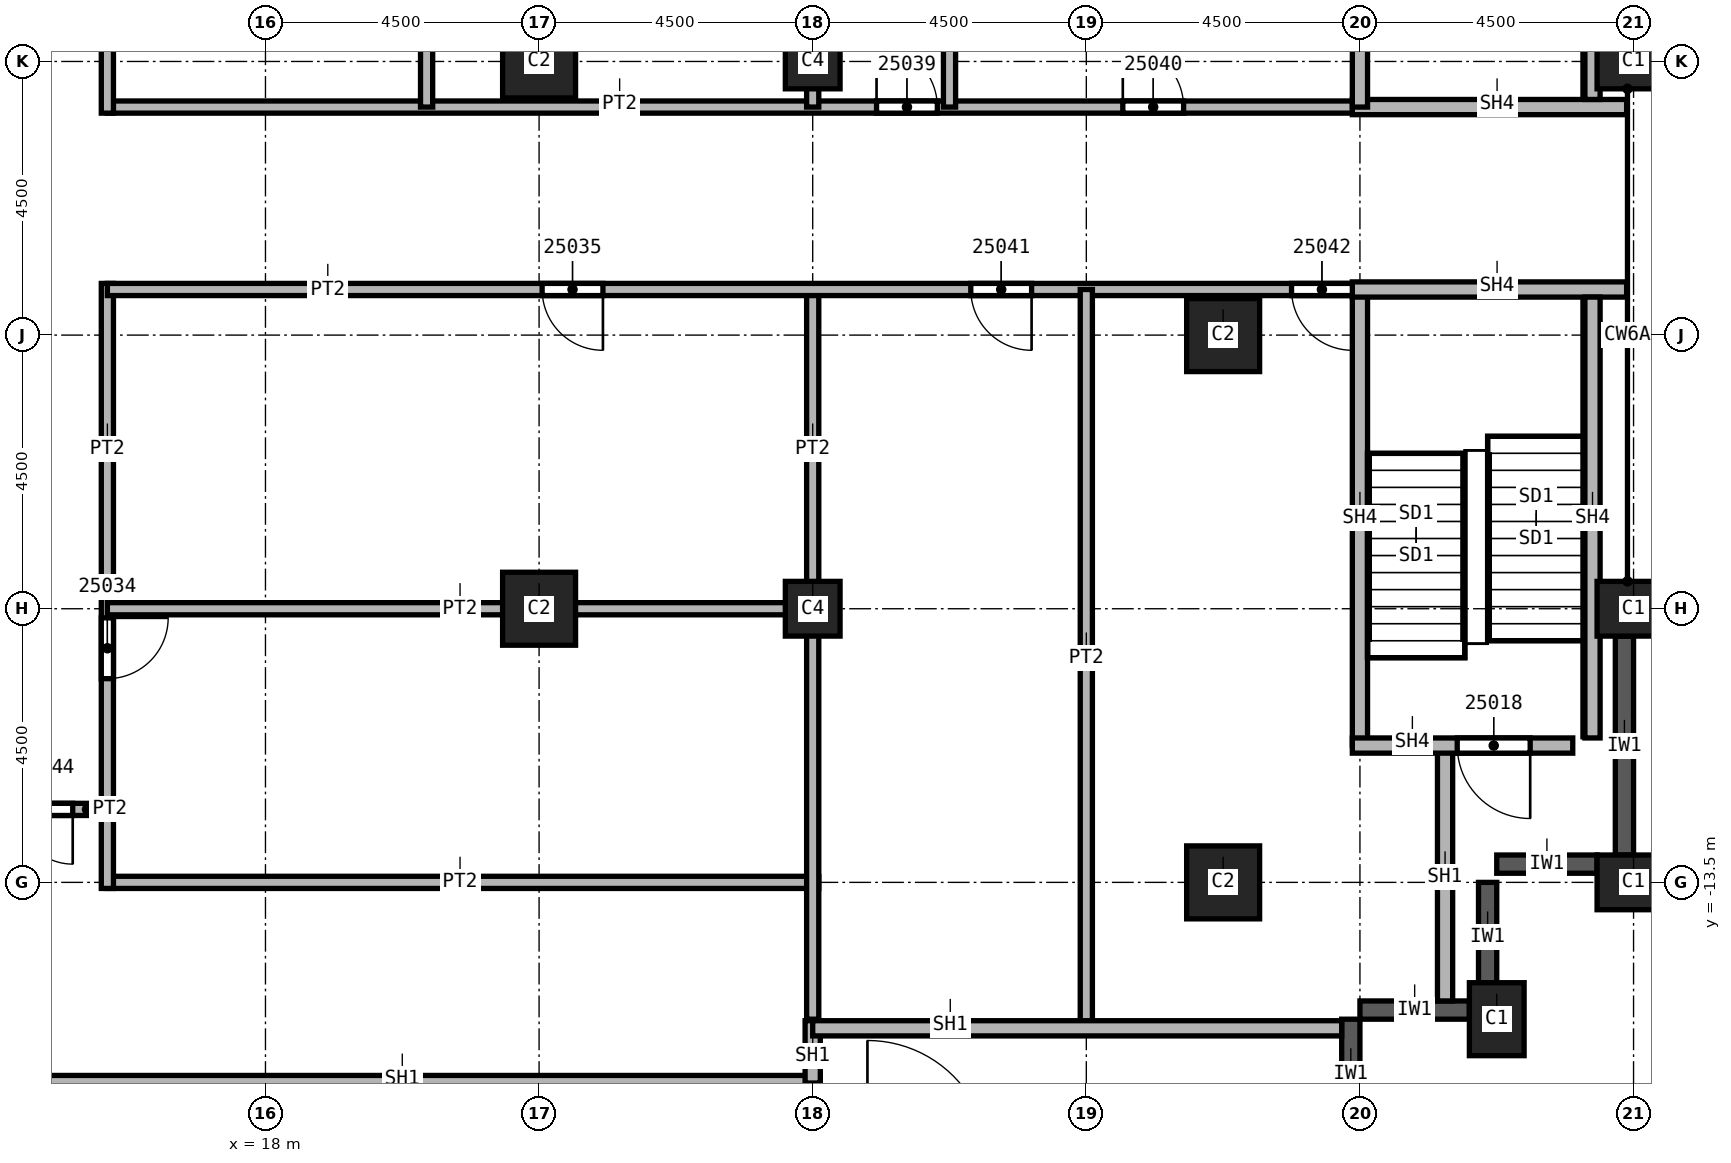
"""IFC4 building model, lengths in metres.
Left out: names, types, materials, properties, quantities, classifications, styles, units other than length and angle.
Written with IfcOpenShell. Run it as: python <this file> out.ifc"""

import sys

from ifc_helpers import new_model, si_unit, direction, frame, frame_2d, origin, origin_2d, place, context, subcontext, project, spatial, rectangle, extrude, element, fill, save


model = new_model("IFC4")
c1 = context("Model", 3, precision=1e-05, world=origin(), true_north=direction((0.0, 1.0)))
c2 = subcontext(c1, "Body", "Model", "MODEL_VIEW")
j1 = project(units=[si_unit("LENGTHUNIT", "METRE"), si_unit("PLANEANGLEUNIT", "RADIAN")], contexts=[c1])
p1 = place(None, origin())
s1 = spatial("IfcSite", under=j1, at=p1, CompositionType="ELEMENT")
p2 = place(p1, origin())
s2 = spatial("IfcBuilding", under=s1, at=p2, CompositionType="ELEMENT")
p3 = place(p2, frame((0.0, 0.0, 60.0)))
s3 = spatial("IfcBuildingStorey", under=s2, at=p3, CompositionType="ELEMENT", Elevation=60.0)
for number, where, z_axis, x_axis in (
    (1, (40.5, 0.0, 0.0), (0.0, 0.0, 1.0), (0.0, 1.0, 0.0)),
    (2, (40.5, -9.0, 0.0), (0.0, 0.0, 1.0), (0.0, 1.0, 0.0)),
    (3, (40.5, -13.5, 0.0), (0.0, 0.0, 1.0), (0.0, 1.0, 0.0)),
    (4, (38.25, -15.75, 0.0), (0.0, 0.0, 1.0), (1.0, 0.0, 0.0)),
):
    element("IfcColumn", number, at=place(p3, frame(where, z_axis=z_axis, x_axis=x_axis)), inside=s3, PredefinedType="COLUMN", context=c2, shape_type="SweptSolid", body=[
        extrude(rectangle(XDim=0.9, YDim=1.2, at=origin_2d()), origin(), (0.0, 0.0, 1.0), 7.7),
    ])
for number, where, z_axis, x_axis in (
    (5, (33.75, -4.5, 0.0), (0.0, 0.0, 1.0), (1.0, 0.0, 0.0)),
    (6, (33.75, -13.5, 0.0), (0.0, 0.0, 1.0), (1.0, 0.0, 0.0)),
    (7, (22.5, 0.0, 0.0), (0.0, 0.0, 1.0), (1.0, 0.0, 0.0)),
    (8, (22.5, -9.0, 0.0), (0.0, 0.0, 1.0), (1.0, 0.0, 0.0)),
):
    element("IfcColumn", number, at=place(p3, frame(where, z_axis=z_axis, x_axis=x_axis)), inside=s3, PredefinedType="COLUMN", context=c2, shape_type="SweptSolid", body=[
        extrude(rectangle(XDim=1.2, YDim=1.2, at=origin_2d()), origin(), (0.0, 0.0, 1.0), 7.7),
    ])
for number, where, z_axis, x_axis in (
    (9, (27.0, 0.0, 0.0), (0.0, 0.0, 1.0), (1.0, 0.0, 0.0)),
    (10, (27.0, -9.0, 0.0), (0.0, 0.0, 1.0), (1.0, 0.0, 0.0)),
):
    element("IfcColumn", number, at=place(p3, frame(where, z_axis=z_axis, x_axis=x_axis)), inside=s3, PredefinedType="COLUMN", context=c2, shape_type="SweptSolid", body=[
        extrude(rectangle(XDim=0.9, YDim=0.9, at=origin_2d()), origin(), (0.0, 0.0, 1.0), 7.7),
    ])
for number, where, z_axis, x_axis in (
    (11, (35.85, -17.55, 0.0), (0.0, 0.0, 1.0), (0.0, 1.0, 0.0)),
    (12, (37.8, -15.6, 0.0), (0.0, 0.0, 1.0), (-1.0, 0.0, 0.0)),
    (13, (38.1, -15.3, 0.0), (0.0, 0.0, 1.0), (0.0, 1.0, 0.0)),
):
    element("IfcWall", number, at=place(p3, frame(where, z_axis=z_axis, x_axis=x_axis)), inside=s3, PredefinedType="SOLIDWALL", context=c2, shape_type="SweptSolid", body=[
        extrude(rectangle(XDim=1.8, YDim=0.3, at=frame_2d((0.9, 0.0))), origin(), (0.0, 0.0, 1.0), 7.1),
    ])
p4 = place(p3, frame((39.9, -13.2, 0.0), z_axis=(0.0, 0.0, 1.0), x_axis=(-1.0, 0.0, 0.0)))
e14 = element("IfcWall", 14, at=p4, inside=s3, PredefinedType="SOLIDWALL", context=c2, shape_type="SweptSolid", body=[
    extrude(rectangle(XDim=1.65, YDim=0.3, at=frame_2d((0.825, 0.0))), origin(), (0.0, 0.0, 1.0), 7.1),
])
p5 = place(p3, frame((40.35, -13.05, 0.0), z_axis=(0.0, 0.0, 1.0), x_axis=(0.0, 1.0, 0.0)))
e15 = element("IfcWall", 15, at=p5, inside=s3, PredefinedType="SOLIDWALL", context=c2, shape_type="SweptSolid", body=[
    extrude(rectangle(XDim=3.6, YDim=0.3, at=frame_2d((1.8, 0.0))), origin(), (0.0, 0.0, 1.0), 7.1),
])
p6 = place(p3, frame((15.4, -13.5, 0.0), z_axis=(0.0, 0.0, 1.0), x_axis=(1.0, 0.0, 0.0)))
e16 = element("IfcWall", 16, at=p6, inside=s3, PredefinedType="PARTITIONING", context=c2, shape_type="SweptSolid", body=[
    extrude(rectangle(XDim=11.7, YDim=0.2, at=frame_2d((5.85, 0.0))), origin(), (0.0, 0.0, 1.0), 7.7),
])
p7 = place(p3, frame((15.4, -3.65, 0.0), z_axis=(0.0, 0.0, 1.0), x_axis=(0.0, -1.0, 0.0)))
e17 = element("IfcWall", 17, at=p7, inside=s3, PredefinedType="PARTITIONING", context=c2, shape_type="SweptSolid", body=[
    extrude(rectangle(XDim=9.95, YDim=0.2, at=frame_2d((4.975, 0.0))), origin(), (0.0, 0.0, 1.0), 7.7),
])
p8 = place(p7, frame((5.5, 0.0, 0.0)))
e18 = element("IfcOpeningElement", 18, at=p8, cuts=e17, PredefinedType="OPENING", context=c2, shape_type="SweptSolid", body=[
    extrude(rectangle(XDim=1.0, YDim=2.1, at=frame_2d((0.5, 1.05))), frame((0.0, 0.1, 0.0), z_axis=(0.0, -1.0, 0.0), x_axis=(1.0, 0.0, 0.0)), (0.0, 0.0, 1.0), 0.2),
])
p9 = place(p3, frame((15.4, -9.0, 0.0), z_axis=(0.0, 0.0, 1.0), x_axis=(1.0, 0.0, 0.0)))
e19 = element("IfcWall", 19, at=p9, inside=s3, PredefinedType="PARTITIONING", context=c2, shape_type="SweptSolid", body=[
    extrude(rectangle(XDim=11.7, YDim=0.2, at=frame_2d((5.85, 0.0))), origin(), (0.0, 0.0, 1.0), 7.7),
])
p10 = place(p3, frame((15.4, -0.75, 0.0), z_axis=(0.0, 0.0, 1.0), x_axis=(1.0, 0.0, 0.0)))
e20 = element("IfcWall", 20, at=p10, inside=s3, PredefinedType="PARTITIONING", context=c2, shape_type="SweptSolid", body=[
    extrude(rectangle(XDim=20.725, YDim=0.2, at=frame_2d((10.363, 0.0))), origin(), (0.0, 0.0, 1.0), 7.7),
])
p11 = place(p10, frame((12.65, 0.0, 0.0)))
e21 = element("IfcOpeningElement", 21, at=p11, cuts=e20, PredefinedType="OPENING", context=c2, shape_type="SweptSolid", body=[
    extrude(rectangle(XDim=1.0, YDim=2.1, at=frame_2d((0.5, 1.05))), frame((0.0, 0.1, 0.0), z_axis=(0.0, -1.0, 0.0), x_axis=(1.0, 0.0, 0.0)), (0.0, 0.0, 1.0), 0.2),
])
p12 = place(p10, frame((16.7, 0.0, 0.0)))
e22 = element("IfcOpeningElement", 22, at=p12, cuts=e20, PredefinedType="OPENING", context=c2, shape_type="SweptSolid", body=[
    extrude(rectangle(XDim=1.0, YDim=2.1, at=frame_2d((0.5, 1.05))), frame((0.0, 0.1, 0.0), z_axis=(0.0, -1.0, 0.0), x_axis=(1.0, 0.0, 0.0)), (0.0, 0.0, 1.0), 0.2),
])
p13 = place(p3, frame((15.4, 12.3, 0.0), z_axis=(0.0, 0.0, 1.0), x_axis=(0.0, -1.0, 0.0)))
e23 = element("IfcWall", 23, at=p13, inside=s3, PredefinedType="PARTITIONING", context=c2, shape_type="SweptSolid", body=[
    extrude(rectangle(XDim=13.15, YDim=0.2, at=frame_2d((6.575, 0.0))), origin(), (0.0, 0.0, 1.0), 7.7),
])
p14 = place(p13, frame((3.9, 0.0, 0.0)))
e24 = element("IfcOpeningElement", 24, at=p14, cuts=e23, PredefinedType="OPENING", context=c2, shape_type="SweptSolid", body=[
    extrude(rectangle(XDim=1.0, YDim=2.1, at=frame_2d((0.5, 1.05))), frame((0.0, 0.1, 0.0), z_axis=(0.0, -1.0, 0.0), x_axis=(1.0, 0.0, 0.0)), (0.0, 0.0, 1.0), 0.2),
])
p15 = place(p3, frame((15.5, -12.3, 0.0), z_axis=(0.0, 0.0, 1.0), x_axis=(-1.0, 0.0, 0.0)))
e25 = element("IfcWall", 25, at=p15, inside=s3, PredefinedType="PARTITIONING", context=c2, shape_type="SweptSolid", body=[
    extrude(rectangle(XDim=2.125, YDim=0.2, at=frame_2d((1.062, 0.0))), origin(), (0.0, 0.0, 1.0), 7.7),
])
p16 = place(p15, frame((0.67, 0.0, 0.0)))
e26 = element("IfcOpeningElement", 26, at=p16, cuts=e25, PredefinedType="OPENING", context=c2, shape_type="SweptSolid", body=[
    extrude(rectangle(XDim=0.9, YDim=2.1, at=frame_2d((0.45, 1.05))), frame((0.0, 0.1, 0.0), z_axis=(0.0, -1.0, 0.0), x_axis=(1.0, 0.0, 0.0)), (0.0, 0.0, 1.0), 0.2),
])
p17 = place(p3, frame((20.65, 16.8, 0.0), z_axis=(0.0, 0.0, 1.0), x_axis=(0.0, -1.0, 0.0)))
e27 = element("IfcWall", 27, at=p17, inside=s3, PredefinedType="PARTITIONING", context=c2, shape_type="SweptSolid", body=[
    extrude(rectangle(XDim=17.55, YDim=0.2, at=frame_2d((8.775, 0.0))), origin(), (0.0, 0.0, 1.0), 7.7),
])
p18 = place(p17, frame((13.65, 0.0, 0.0)))
e28 = element("IfcOpeningElement", 28, at=p18, cuts=e27, PredefinedType="OPENING", context=c2, shape_type="SweptSolid", body=[
    extrude(rectangle(XDim=1.0, YDim=2.1, at=frame_2d((0.5, 1.05))), frame((0.0, 0.1, 0.0), z_axis=(0.0, -1.0, 0.0), x_axis=(1.0, 0.0, 0.0)), (0.0, 0.0, 1.0), 0.2),
])
p19 = place(p17, frame((3.25, 0.0, 0.0)))
e29 = element("IfcOpeningElement", 29, at=p19, cuts=e27, PredefinedType="OPENING", context=c2, shape_type="SweptSolid", body=[
    extrude(rectangle(XDim=1.0, YDim=2.1, at=frame_2d((0.5, 1.05))), frame((0.0, 0.1, 0.0), z_axis=(0.0, -1.0, 0.0), x_axis=(1.0, 0.0, 0.0)), (0.0, 0.0, 1.0), 0.2),
])
p20 = place(p3, frame((27.0, -3.75, 0.0), z_axis=(0.0, 0.0, 1.0), x_axis=(0.0, -1.0, 0.0)))
e30 = element("IfcWall", 30, at=p20, inside=s3, PredefinedType="PARTITIONING", context=c2, shape_type="SweptSolid", body=[
    extrude(rectangle(XDim=12.0, YDim=0.2, at=frame_2d((6.0, 0.0))), origin(), (0.0, 0.0, 1.0), 7.7),
])
p21 = place(p3, frame((27.0, 15.9, 0.0), z_axis=(0.0, 0.0, 1.0), x_axis=(0.0, -1.0, 0.0)))
e31 = element("IfcWall", 31, at=p21, inside=s3, PredefinedType="PARTITIONING", context=c2, shape_type="SweptSolid", body=[
    extrude(rectangle(XDim=16.65, YDim=0.2, at=frame_2d((8.325, 0.0))), origin(), (0.0, 0.0, 1.0), 7.7),
])
p22 = place(p3, frame((36.125, -3.75, 0.0), z_axis=(0.0, 0.0, 1.0), x_axis=(-1.0, 0.0, 0.0)))
e32 = element("IfcWall", 32, at=p22, inside=s3, PredefinedType="PARTITIONING", context=c2, shape_type="SweptSolid", body=[
    extrude(rectangle(XDim=20.725, YDim=0.2, at=frame_2d((10.363, 0.0))), origin(), (0.0, 0.0, 1.0), 7.7),
])
p23 = place(p22, frame((12.575, 0.0, 0.0)))
e33 = element("IfcOpeningElement", 33, at=p23, cuts=e32, PredefinedType="OPENING", context=c2, shape_type="SweptSolid", body=[
    extrude(rectangle(XDim=1.0, YDim=2.1, at=frame_2d((0.5, 1.05))), frame((0.0, 0.1, 0.0), z_axis=(0.0, -1.0, 0.0), x_axis=(1.0, 0.0, 0.0)), (0.0, 0.0, 1.0), 0.2),
])
p24 = place(p22, frame((5.525, 0.0, 0.0)))
e34 = element("IfcOpeningElement", 34, at=p24, cuts=e32, PredefinedType="OPENING", context=c2, shape_type="SweptSolid", body=[
    extrude(rectangle(XDim=1.0, YDim=2.1, at=frame_2d((0.5, 1.05))), frame((0.0, 0.1, 0.0), z_axis=(0.0, -1.0, 0.0), x_axis=(1.0, 0.0, 0.0)), (0.0, 0.0, 1.0), 0.2),
])
p25 = place(p22, frame((0.25, 0.0, 0.0)))
e35 = element("IfcOpeningElement", 35, at=p25, cuts=e32, PredefinedType="OPENING", context=c2, shape_type="SweptSolid", body=[
    extrude(rectangle(XDim=1.0, YDim=2.1, at=frame_2d((0.5, 1.05))), frame((0.0, 0.1, 0.0), z_axis=(0.0, -1.0, 0.0), x_axis=(1.0, 0.0, 0.0)), (0.0, 0.0, 1.0), 0.2),
])
p26 = place(p3, frame((29.25, 15.9, 0.0), z_axis=(0.0, 0.0, 1.0), x_axis=(0.0, -1.0, 0.0)))
e36 = element("IfcWall", 36, at=p26, inside=s3, PredefinedType="PARTITIONING", context=c2, shape_type="SweptSolid", body=[
    extrude(rectangle(XDim=16.65, YDim=0.2, at=frame_2d((8.325, 0.0))), origin(), (0.0, 0.0, 1.0), 7.7),
])
p27 = place(p3, frame((31.5, -3.75, 0.0), z_axis=(0.0, 0.0, 1.0), x_axis=(0.0, -1.0, 0.0)))
e37 = element("IfcWall", 37, at=p27, inside=s3, PredefinedType="PARTITIONING", context=c2, shape_type="SweptSolid", body=[
    extrude(rectangle(XDim=12.15, YDim=0.2, at=frame_2d((6.075, 0.0))), origin(), (0.0, 0.0, 1.0), 7.7),
])
p28 = place(p3, frame((13.5, -16.8, 0.0), z_axis=(0.0, 0.0, 1.0), x_axis=(1.0, 0.0, 0.0)))
e38 = element("IfcWall", 38, at=p28, inside=s3, PredefinedType="SOLIDWALL", context=c2, shape_type="SweptSolid", body=[
    extrude(rectangle(XDim=13.625, YDim=0.25, at=frame_2d((6.812, 0.0))), origin(), (0.0, 0.0, 1.0), 7.7),
])
p29 = place(p3, frame((27.0, -16.8, 0.0), z_axis=(0.0, 0.0, 1.0), x_axis=(0.0, 1.0, 0.0)))
e39 = element("IfcWall", 39, at=p29, inside=s3, PredefinedType="SOLIDWALL", context=c2, shape_type="SweptSolid", body=[
    extrude(rectangle(XDim=1.025, YDim=0.25, at=frame_2d((0.513, 0.0))), origin(), (0.0, 0.0, 1.0), 7.7),
])
p30 = place(p3, frame((27.0, -15.9, 0.0), z_axis=(0.0, 0.0, 1.0), x_axis=(1.0, 0.0, 0.0)))
e40 = element("IfcWall", 40, at=p30, inside=s3, PredefinedType="SOLIDWALL", context=c2, shape_type="SweptSolid", body=[
    extrude(rectangle(XDim=8.7, YDim=0.25, at=frame_2d((4.35, 0.0))), origin(), (0.0, 0.0, 1.0), 7.7),
])
p31 = place(p3, frame((37.4, -15.45, 0.0), z_axis=(0.0, 0.0, 1.0), x_axis=(0.0, 1.0, 0.0)))
e41 = element("IfcWall", 41, at=p31, inside=s3, PredefinedType="SOLIDWALL", context=c2, shape_type="SweptSolid", body=[
    extrude(rectangle(XDim=4.2, YDim=0.25, at=frame_2d((2.1, 0.0))), origin(), (0.0, 0.0, 1.0), 7.7),
])
p32 = place(p3, frame((35.875, -0.75, 0.0), z_axis=(0.0, 0.0, 1.0), x_axis=(1.0, 0.0, 0.0)))
e42 = element("IfcWall", 42, at=p32, inside=s3, PredefinedType="SOLIDWALL", context=c2, shape_type="SweptSolid", body=[
    extrude(rectangle(XDim=4.511, YDim=0.25, at=frame_2d((2.255, 0.0))), origin(), (0.0, 0.0, 1.0), 7.7),
])
for number, where, z_axis, x_axis in (
    (43, (36.0, -11.25, 0.0), (0.0, 0.0, 1.0), (0.0, 1.0, 0.0)),
    (44, (36.0, -0.75, 0.0), (0.0, 0.0, 1.0), (0.0, 1.0, 0.0)),
):
    element("IfcWall", number, at=place(p3, frame(where, z_axis=z_axis, x_axis=x_axis)), inside=s3, PredefinedType="SOLIDWALL", context=c2, shape_type="SweptSolid", body=[
        extrude(rectangle(XDim=7.5, YDim=0.25, at=frame_2d((3.75, 0.0))), origin(), (0.0, 0.0, 1.0), 7.7),
    ])
p33 = place(p3, frame((39.5, -11.25, 0.0), z_axis=(0.0, 0.0, 1.0), x_axis=(-1.0, 0.0, 0.0)))
e45 = element("IfcWall", 45, at=p33, inside=s3, PredefinedType="SOLIDWALL", context=c2, shape_type="SweptSolid", body=[
    extrude(rectangle(XDim=3.625, YDim=0.25, at=frame_2d((1.812, 0.0))), origin(), (0.0, 0.0, 1.0), 7.7),
])
p34 = place(p33, frame((0.7, 0.0, 0.0)))
e46 = element("IfcOpeningElement", 46, at=p34, cuts=e45, PredefinedType="OPENING", context=c2, shape_type="SweptSolid", body=[
    extrude(rectangle(XDim=1.2, YDim=2.1, at=frame_2d((0.6, 1.05))), frame((0.0, 0.125, 0.0), z_axis=(0.0, -1.0, 0.0), x_axis=(1.0, 0.0, 0.0)), (0.0, 0.0, 1.0), 0.25),
])
p35 = place(p3, frame((40.386, -3.75, 0.0), z_axis=(0.0, 0.0, 1.0), x_axis=(-1.0, 0.0, 0.0)))
e47 = element("IfcWall", 47, at=p35, inside=s3, PredefinedType="SOLIDWALL", context=c2, shape_type="SweptSolid", body=[
    extrude(rectangle(XDim=4.511, YDim=0.25, at=frame_2d((2.255, 0.0))), origin(), (0.0, 0.0, 1.0), 7.7),
])
for number, where, z_axis, x_axis in (
    (48, (39.825, -11.125, 0.0), (0.0, 0.0, 1.0), (0.0, 1.0, 0.0)),
    (49, (39.825, -0.625, 0.0), (0.0, 0.0, 1.0), (0.0, 1.0, 0.0)),
):
    element("IfcWall", number, at=place(p3, frame(where, z_axis=z_axis, x_axis=x_axis)), inside=s3, PredefinedType="SOLIDWALL", context=c2, shape_type="SweptSolid", body=[
        extrude(rectangle(XDim=7.25, YDim=0.25, at=frame_2d((3.625, 0.0))), origin(), (0.0, 0.0, 1.0), 7.7),
    ])
p36 = place(p34, origin())
e50 = element("IfcDoor", 50, at=p36, inside=s3, OperationType="SINGLE_SWING_LEFT", PredefinedType="DOOR", context=c2, shape_type="SweptSolid", body=[
    extrude(rectangle(XDim=1.2, YDim=2.1, at=frame_2d((0.6, 1.05))), frame((0.0, 0.025, 0.0), z_axis=(0.0, -1.0, 0.0), x_axis=(1.0, 0.0, 0.0)), (0.0, 0.0, 1.0), 0.05),
])
fill(e46, e50)
p37 = place(p8, origin())
e51 = element("IfcDoor", 51, at=p37, inside=s3, OperationType="SINGLE_SWING_LEFT", PredefinedType="DOOR", context=c2, shape_type="SweptSolid", body=[
    extrude(rectangle(XDim=1.0, YDim=2.1, at=frame_2d((0.5, 1.05))), frame((0.0, 0.025, 0.0), z_axis=(0.0, -1.0, 0.0), x_axis=(1.0, 0.0, 0.0)), (0.0, 0.0, 1.0), 0.05),
])
fill(e18, e51)
p38 = place(p23, origin())
e52 = element("IfcDoor", 52, at=p38, inside=s3, OperationType="SINGLE_SWING_RIGHT", PredefinedType="DOOR", context=c2, shape_type="SweptSolid", body=[
    extrude(rectangle(XDim=1.0, YDim=2.1, at=frame_2d((0.5, 1.05))), frame((0.0, 0.025, 0.0), z_axis=(0.0, -1.0, 0.0), x_axis=(1.0, 0.0, 0.0)), (0.0, 0.0, 1.0), 0.05),
])
fill(e33, e52)
p39 = place(p11, origin())
e53 = element("IfcDoor", 53, at=p39, inside=s3, OperationType="SINGLE_SWING_RIGHT", PredefinedType="DOOR", context=c2, shape_type="SweptSolid", body=[
    extrude(rectangle(XDim=1.0, YDim=2.1, at=frame_2d((0.5, 1.05))), frame((0.0, 0.025, 0.0), z_axis=(0.0, -1.0, 0.0), x_axis=(1.0, 0.0, 0.0)), (0.0, 0.0, 1.0), 0.05),
])
fill(e21, e53)
p40 = place(p12, origin())
e54 = element("IfcDoor", 54, at=p40, inside=s3, OperationType="SINGLE_SWING_LEFT", PredefinedType="DOOR", context=c2, shape_type="SweptSolid", body=[
    extrude(rectangle(XDim=1.0, YDim=2.1, at=frame_2d((0.5, 1.05))), frame((0.0, 0.025, 0.0), z_axis=(0.0, -1.0, 0.0), x_axis=(1.0, 0.0, 0.0)), (0.0, 0.0, 1.0), 0.05),
])
fill(e22, e54)
p41 = place(p24, origin())
e55 = element("IfcDoor", 55, at=p41, inside=s3, OperationType="SINGLE_SWING_RIGHT", PredefinedType="DOOR", context=c2, shape_type="SweptSolid", body=[
    extrude(rectangle(XDim=1.0, YDim=2.1, at=frame_2d((0.5, 1.05))), frame((0.0, 0.025, 0.0), z_axis=(0.0, -1.0, 0.0), x_axis=(1.0, 0.0, 0.0)), (0.0, 0.0, 1.0), 0.05),
])
fill(e34, e55)
p42 = place(p25, origin())
e56 = element("IfcDoor", 56, at=p42, inside=s3, OperationType="SINGLE_SWING_LEFT", PredefinedType="DOOR", context=c2, shape_type="SweptSolid", body=[
    extrude(rectangle(XDim=1.0, YDim=2.1, at=frame_2d((0.5, 1.05))), frame((0.0, 0.025, 0.0), z_axis=(0.0, -1.0, 0.0), x_axis=(1.0, 0.0, 0.0)), (0.0, 0.0, 1.0), 0.05),
])
fill(e35, e56)
p43 = place(p16, origin())
e57 = element("IfcDoor", 57, at=p43, inside=s3, OperationType="SINGLE_SWING_LEFT", PredefinedType="DOOR", context=c2, shape_type="SweptSolid", body=[
    extrude(rectangle(XDim=0.9, YDim=2.1, at=frame_2d((0.45, 1.05))), frame((0.0, 0.025, 0.0), z_axis=(0.0, -1.0, 0.0), x_axis=(1.0, 0.0, 0.0)), (0.0, 0.0, 1.0), 0.05),
])
fill(e26, e57)
save(model, sys.argv[1])
